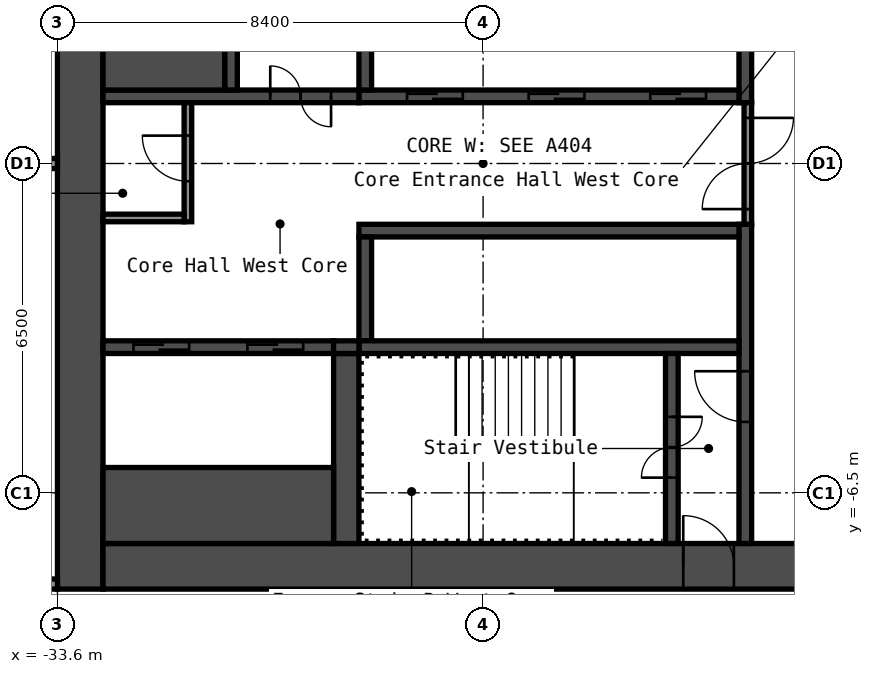
"""IFC4 building model, lengths in metres.
Left out: names, types, materials, properties, quantities, classifications, styles, units other than length and angle.
Written with IfcOpenShell. Run it as: python <this file> out.ifc"""

import sys

from ifc_helpers import new_model, si_unit, direction, frame, frame_2d, origin, place, context, subcontext, project, spatial, rectangle, extrude, element, fill, save


model = new_model("IFC4")
c1 = context("Model", 3, precision=1e-05, world=origin(), true_north=direction((0.0, 1.0)))
c2 = subcontext(c1, "Body", "Model", "MODEL_VIEW")
j1 = project(units=[si_unit("LENGTHUNIT", "METRE"), si_unit("PLANEANGLEUNIT", "RADIAN")], contexts=[c1])
p1 = place(None, origin())
s1 = spatial("IfcSite", under=j1, at=p1, CompositionType="ELEMENT")
p2 = place(p1, origin())
s2 = spatial("IfcBuilding", under=s1, at=p2, CompositionType="ELEMENT")
p3 = place(p2, frame((0.0, 0.0, 26.2)))
s3 = spatial("IfcBuildingStorey", under=s2, at=p3, CompositionType="ELEMENT", Elevation=26.2)
p4 = place(p3, frame((-33.15, -8.4, 0.0), z_axis=(0.0, 0.0, 1.0), x_axis=(0.0, 1.0, 0.0)))
e1 = element("IfcWall", 1, at=p4, inside=s3, PredefinedType="SHEAR", context=c2, shape_type="SweptSolid", body=[
    extrude(rectangle(XDim=16.8, YDim=0.9, at=frame_2d((8.4, 0.0))), origin(), (0.0, 0.0, 1.0), 2.8),
])
p5 = place(p3, frame((-32.7, -7.95, 0.0), z_axis=(0.0, 0.0, 1.0), x_axis=(1.0, 0.0, 0.0)))
e2 = element("IfcWall", 2, at=p5, inside=s3, PredefinedType="SHEAR", context=c2, shape_type="SweptSolid", body=[
    extrude(rectangle(XDim=15.0, YDim=0.9, at=frame_2d((7.5, 0.0))), origin(), (0.0, 0.0, 1.0), 2.8),
])
p6 = place(p5, frame((11.45, 0.0, 0.0)))
e3 = element("IfcOpeningElement", 3, at=p6, cuts=e2, PredefinedType="OPENING", context=c2, shape_type="SweptSolid", body=[
    extrude(rectangle(XDim=1.0, YDim=2.1, at=frame_2d((0.5, 1.05))), frame((0.0, 0.46, 0.0), z_axis=(0.0, -1.0, 0.0), x_axis=(1.0, 0.0, 0.0)), (0.0, 0.0, 1.0), 0.92),
])
p7 = place(p3, frame((-20.025, 1.2, 0.0), z_axis=(0.0, 0.0, 1.0), x_axis=(0.0, 1.0, 0.0)))
e4 = element("IfcWall", 4, at=p7, inside=s3, PredefinedType="SHEAR", context=c2, shape_type="SweptSolid", body=[
    extrude(rectangle(XDim=6.3, YDim=0.25, at=frame_2d((3.15, 0.0))), origin(), (0.0, 0.0, 1.0), 2.8),
])
p8 = place(p3, frame((-20.025, -7.5, 0.0), z_axis=(0.0, 0.0, 1.0), x_axis=(0.0, 1.0, 0.0)))
e5 = element("IfcWall", 5, at=p8, inside=s3, PredefinedType="SHEAR", context=c2, shape_type="SweptSolid", body=[
    extrude(rectangle(XDim=6.3, YDim=0.25, at=frame_2d((3.15, 0.0))), origin(), (0.0, 0.0, 1.0), 2.8),
])
p9 = place(p8, frame((2.4, 0.0, 0.0)))
e6 = element("IfcOpeningElement", 6, at=p9, cuts=e5, PredefinedType="OPENING", context=c2, shape_type="SweptSolid", body=[
    extrude(rectangle(XDim=1.0, YDim=2.1, at=frame_2d((0.5, 1.05))), frame((0.0, 0.135, 0.0), z_axis=(0.0, -1.0, 0.0), x_axis=(1.0, 0.0, 0.0)), (0.0, 0.0, 1.0), 0.27),
])
p10 = place(p3, frame((-27.65, 1.325, 0.0), z_axis=(0.0, 0.0, 1.0), x_axis=(1.0, 0.0, 0.0)))
e7 = element("IfcWall", 7, at=p10, inside=s3, PredefinedType="SHEAR", context=c2, shape_type="SweptSolid", body=[
    extrude(rectangle(XDim=7.5, YDim=0.25, at=frame_2d((3.75, 0.0))), origin(), (0.0, 0.0, 1.0), 2.8),
])
p11 = place(p10, frame((5.75, 0.0, 0.0)))
e8 = element("IfcOpeningElement", 8, at=p11, cuts=e7, PredefinedType="OPENING", context=c2, shape_type="SweptSolid", body=[
    extrude(rectangle(XDim=1.1, YDim=2.1, at=frame_2d((0.55, 1.05))), frame((0.0, 0.135, 0.0), z_axis=(0.0, -1.0, 0.0), x_axis=(1.0, 0.0, 0.0)), (0.0, 0.0, 1.0), 0.27),
])
p12 = place(p10, frame((3.35, 0.0, 0.0)))
e9 = element("IfcOpeningElement", 9, at=p12, cuts=e7, PredefinedType="OPENING", context=c2, shape_type="SweptSolid", body=[
    extrude(rectangle(XDim=1.1, YDim=2.1, at=frame_2d((0.55, 1.05))), frame((0.0, 0.135, 0.0), z_axis=(0.0, -1.0, 0.0), x_axis=(1.0, 0.0, 0.0)), (0.0, 0.0, 1.0), 0.27),
])
p13 = place(p10, frame((0.95, 0.0, 0.0)))
e10 = element("IfcOpeningElement", 10, at=p13, cuts=e7, PredefinedType="OPENING", context=c2, shape_type="SweptSolid", body=[
    extrude(rectangle(XDim=1.1, YDim=2.1, at=frame_2d((0.55, 1.05))), frame((0.0, 0.135, 0.0), z_axis=(0.0, -1.0, 0.0), x_axis=(1.0, 0.0, 0.0)), (0.0, 0.0, 1.0), 0.27),
])
p14 = place(p3, frame((-27.525, 1.45, 0.0), z_axis=(0.0, 0.0, 1.0), x_axis=(0.0, 1.0, 0.0)))
e11 = element("IfcWall", 11, at=p14, inside=s3, PredefinedType="SHEAR", context=c2, shape_type="SweptSolid", body=[
    extrude(rectangle(XDim=2.05, YDim=0.25, at=frame_2d((1.025, 0.0))), origin(), (0.0, 0.0, 1.0), 2.8),
])
p15 = place(p3, frame((-32.7, 1.325, 0.0), z_axis=(0.0, 0.0, 1.0), x_axis=(1.0, 0.0, 0.0)))
e12 = element("IfcWall", 12, at=p15, inside=s3, PredefinedType="SHEAR", context=c2, shape_type="SweptSolid", body=[
    extrude(rectangle(XDim=5.05, YDim=0.25, at=frame_2d((2.525, 0.0))), origin(), (0.0, 0.0, 1.0), 2.8),
])
p16 = place(p15, frame((3.3, 0.0, 0.0)))
e13 = element("IfcOpeningElement", 13, at=p16, cuts=e12, PredefinedType="OPENING", context=c2, shape_type="SweptSolid", body=[
    extrude(rectangle(XDim=1.2, YDim=2.1, at=frame_2d((0.6, 1.05))), frame((0.0, 0.135, 0.0), z_axis=(0.0, -1.0, 0.0), x_axis=(1.0, 0.0, 0.0)), (0.0, 0.0, 1.0), 0.27),
])
p17 = place(p3, frame((-30.175, 1.45, 0.0), z_axis=(0.0, 0.0, 1.0), x_axis=(0.0, 1.0, 0.0)))
e14 = element("IfcWall", 14, at=p17, inside=s3, PredefinedType="SHEAR", context=c2, shape_type="SweptSolid", body=[
    extrude(rectangle(XDim=6.05, YDim=0.25, at=frame_2d((3.025, 0.0))), origin(), (0.0, 0.0, 1.0), 2.8),
])
p18 = place(p17, frame((2.625, 0.0, 0.0)))
e15 = element("IfcOpeningElement", 15, at=p18, cuts=e14, PredefinedType="OPENING", context=c2, shape_type="SweptSolid", body=[
    extrude(rectangle(XDim=1.1, YDim=2.1, at=frame_2d((0.55, 1.05))), frame((0.0, 0.135, 0.0), z_axis=(0.0, -1.0, 0.0), x_axis=(1.0, 0.0, 0.0)), (0.0, 0.0, 1.0), 0.27),
])
p19 = place(p3, frame((-32.7, 2.375, 0.0), z_axis=(0.0, 0.0, 1.0), x_axis=(1.0, 0.0, 0.0)))
e16 = element("IfcWall", 16, at=p19, inside=s3, PredefinedType="SHEAR", context=c2, shape_type="SweptSolid", body=[
    extrude(rectangle(XDim=2.4, YDim=1.85, at=frame_2d((1.2, 0.0))), origin(), (0.0, 0.0, 1.0), 2.8),
])
p20 = place(p3, frame((-27.65, -1.325, 0.0), z_axis=(0.0, 0.0, 1.0), x_axis=(1.0, 0.0, 0.0)))
e17 = element("IfcWall", 17, at=p20, inside=s3, PredefinedType="SHEAR", context=c2, shape_type="SweptSolid", body=[
    extrude(rectangle(XDim=7.5, YDim=0.25, at=frame_2d((3.75, 0.0))), origin(), (0.0, 0.0, 1.0), 2.8),
])
p21 = place(p3, frame((-27.525, -3.5, 0.0), z_axis=(0.0, 0.0, 1.0), x_axis=(0.0, 1.0, 0.0)))
e18 = element("IfcWall", 18, at=p21, inside=s3, PredefinedType="SHEAR", context=c2, shape_type="SweptSolid", body=[
    extrude(rectangle(XDim=2.05, YDim=0.25, at=frame_2d((1.025, 0.0))), origin(), (0.0, 0.0, 1.0), 2.8),
])
p22 = place(p3, frame((-27.65, -3.625, 0.0), z_axis=(0.0, 0.0, 1.0), x_axis=(1.0, 0.0, 0.0)))
e19 = element("IfcWall", 19, at=p22, inside=s3, PredefinedType="SHEAR", context=c2, shape_type="SweptSolid", body=[
    extrude(rectangle(XDim=7.5, YDim=0.25, at=frame_2d((3.75, 0.0))), origin(), (0.0, 0.0, 1.0), 2.8),
])
p23 = place(p3, frame((-21.475, -7.5, 0.0), z_axis=(0.0, 0.0, 1.0), x_axis=(0.0, 1.0, 0.0)))
e20 = element("IfcWall", 20, at=p23, inside=s3, PredefinedType="SHEAR", context=c2, shape_type="SweptSolid", body=[
    extrude(rectangle(XDim=3.75, YDim=0.25, at=frame_2d((1.875, 0.0))), origin(), (0.0, 0.0, 1.0), 2.8),
])
p24 = place(p23, frame((1.3, 0.0, 0.0)))
e21 = element("IfcOpeningElement", 21, at=p24, cuts=e20, PredefinedType="OPENING", context=c2, shape_type="SweptSolid", body=[
    extrude(rectangle(XDim=1.2, YDim=2.1, at=frame_2d((0.6, 1.05))), frame((0.0, 0.135, 0.0), z_axis=(0.0, -1.0, 0.0), x_axis=(1.0, 0.0, 0.0)), (0.0, 0.0, 1.0), 0.27),
])
p25 = place(p3, frame((-27.9, -7.5, 0.0), z_axis=(0.0, 0.0, 1.0), x_axis=(0.0, 1.0, 0.0)))
e22 = element("IfcWall", 22, at=p25, inside=s3, PredefinedType="SHEAR", context=c2, shape_type="SweptSolid", body=[
    extrude(rectangle(XDim=3.75, YDim=0.5, at=frame_2d((1.875, 0.0))), origin(), (0.0, 0.0, 1.0), 2.8),
])
p26 = place(p3, frame((-32.7, -3.625, 0.0), z_axis=(0.0, 0.0, 1.0), x_axis=(1.0, 0.0, 0.0)))
e23 = element("IfcWall", 23, at=p26, inside=s3, PredefinedType="SHEAR", context=c2, shape_type="SweptSolid", body=[
    extrude(rectangle(XDim=4.55, YDim=0.25, at=frame_2d((2.275, 0.0))), origin(), (0.0, 0.0, 1.0), 2.8),
])
p27 = place(p26, frame((2.85, 0.0, 0.0)))
e24 = element("IfcOpeningElement", 24, at=p27, cuts=e23, PredefinedType="OPENING", context=c2, shape_type="SweptSolid", body=[
    extrude(rectangle(XDim=1.1, YDim=2.1, at=frame_2d((0.55, 1.05))), frame((0.0, 0.135, 0.0), z_axis=(0.0, -1.0, 0.0), x_axis=(1.0, 0.0, 0.0)), (0.0, 0.0, 1.0), 0.27),
])
p28 = place(p26, frame((0.6, 0.0, 0.0)))
e25 = element("IfcOpeningElement", 25, at=p28, cuts=e23, PredefinedType="OPENING", context=c2, shape_type="SweptSolid", body=[
    extrude(rectangle(XDim=1.1, YDim=2.1, at=frame_2d((0.55, 1.05))), frame((0.0, 0.135, 0.0), z_axis=(0.0, -1.0, 0.0), x_axis=(1.0, 0.0, 0.0)), (0.0, 0.0, 1.0), 0.27),
])
p29 = place(p3, frame((-32.7, -6.75, 0.0), z_axis=(0.0, 0.0, 1.0), x_axis=(1.0, 0.0, 0.0)))
e26 = element("IfcWall", 26, at=p29, inside=s3, PredefinedType="SHEAR", context=c2, shape_type="SweptSolid", body=[
    extrude(rectangle(XDim=4.55, YDim=1.5, at=frame_2d((2.275, 0.0))), origin(), (0.0, 0.0, 1.0), 2.8),
])
p30 = place(p3, frame((-28.15, -3.625, 0.0), z_axis=(0.0, 0.0, 1.0), x_axis=(1.0, 0.0, 0.0)))
e27 = element("IfcWall", 27, at=p30, inside=s3, PredefinedType="SHEAR", context=c2, shape_type="SweptSolid", body=[
    extrude(rectangle(XDim=0.5, YDim=0.25, at=frame_2d((0.25, 0.0))), origin(), (0.0, 0.0, 1.0), 2.8),
])
p31 = place(p3, frame((-19.975, -1.2, 0.0), z_axis=(0.0, 0.0, 1.0), x_axis=(0.0, 1.0, 0.0)))
e28 = element("IfcWall", 28, at=p31, inside=s3, PredefinedType="PARTITIONING", context=c2, shape_type="SweptSolid", body=[
    extrude(rectangle(XDim=2.4, YDim=0.15, at=frame_2d((1.2, 0.0))), origin(), (0.0, 0.0, 1.0), 2.8),
])
p32 = place(p31, frame((0.3, 0.0, 0.0)))
e29 = element("IfcOpeningElement", 29, at=p32, cuts=e28, PredefinedType="OPENING", context=c2, shape_type="SweptSolid", body=[
    extrude(rectangle(XDim=1.8, YDim=2.1, at=frame_2d((0.9, 1.05))), frame((0.0, 0.085, 0.0), z_axis=(0.0, -1.0, 0.0), x_axis=(1.0, 0.0, 0.0)), (0.0, 0.0, 1.0), 0.17),
])
p33 = place(p3, frame((-31.025, -1.15, 0.0), z_axis=(0.0, 0.0, 1.0), x_axis=(0.0, 1.0, 0.0)))
e30 = element("IfcWall", 30, at=p33, inside=s3, PredefinedType="PARTITIONING", context=c2, shape_type="SweptSolid", body=[
    extrude(rectangle(XDim=2.35, YDim=0.15, at=frame_2d((1.175, 0.0))), origin(), (0.0, 0.0, 1.0), 2.8),
])
p34 = place(p33, frame((0.8, 0.0, 0.0)))
e31 = element("IfcOpeningElement", 31, at=p34, cuts=e30, PredefinedType="OPENING", context=c2, shape_type="SweptSolid", body=[
    extrude(rectangle(XDim=0.9, YDim=2.1, at=frame_2d((0.45, 1.05))), frame((0.0, 0.085, 0.0), z_axis=(0.0, -1.0, 0.0), x_axis=(1.0, 0.0, 0.0)), (0.0, 0.0, 1.0), 0.17),
])
p35 = place(p3, frame((-32.7, -1.075, 0.0), z_axis=(0.0, 0.0, 1.0), x_axis=(1.0, 0.0, 0.0)))
e32 = element("IfcWall", 32, at=p35, inside=s3, PredefinedType="PARTITIONING", context=c2, shape_type="SweptSolid", body=[
    extrude(rectangle(XDim=1.6, YDim=0.15, at=frame_2d((0.8, 0.0))), origin(), (0.0, 0.0, 1.0), 2.8),
])
p36 = place(p3, frame((-48.6, -8.3, 0.0), z_axis=(0.0, 0.0, 1.0), x_axis=(1.0, 0.0, 0.0)))
e33 = element("IfcWall", 33, at=p36, inside=s3, PredefinedType="PARTITIONING", context=c2, shape_type="SweptSolid", body=[
    extrude(rectangle(XDim=15.0, YDim=0.2, at=frame_2d((7.5, 0.0))), origin(), (0.0, 0.0, 1.0), 2.8),
])
p37 = place(p36, frame((1.1, 0.0, 0.0)))
e34 = element("IfcOpeningElement", 34, at=p37, cuts=e33, PredefinedType="OPENING", context=c2, shape_type="SweptSolid", body=[
    extrude(rectangle(XDim=1.0, YDim=2.1, at=frame_2d((0.5, 1.05))), frame((0.0, 0.11, 0.0), z_axis=(0.0, -1.0, 0.0), x_axis=(1.0, 0.0, 0.0)), (0.0, 0.0, 1.0), 0.22),
])
p38 = place(p36, frame((12.4, 0.0, 0.0)))
e35 = element("IfcOpeningElement", 35, at=p38, cuts=e33, PredefinedType="OPENING", context=c2, shape_type="SweptSolid", body=[
    extrude(rectangle(XDim=1.0, YDim=2.1, at=frame_2d((0.5, 1.05))), frame((0.0, 0.11, 0.0), z_axis=(0.0, -1.0, 0.0), x_axis=(1.0, 0.0, 0.0)), (0.0, 0.0, 1.0), 0.22),
])
p39 = place(p3, frame((-48.5, 0.0, 0.0), z_axis=(0.0, 0.0, 1.0), x_axis=(1.0, 0.0, 0.0)))
e36 = element("IfcWall", 36, at=p39, inside=s3, PredefinedType="PARTITIONING", context=c2, shape_type="SweptSolid", body=[
    extrude(rectangle(XDim=14.9, YDim=0.2, at=frame_2d((7.45, 0.0))), origin(), (0.0, 0.0, 1.0), 2.8),
])
p40 = place(p6, origin())
e37 = element("IfcDoor", 37, at=p40, inside=s3, OperationType="SINGLE_SWING_RIGHT", PredefinedType="DOOR", context=c2, shape_type="SweptSolid", body=[
    extrude(rectangle(XDim=1.0, YDim=2.1, at=frame_2d((0.5, 1.05))), frame((0.0, 0.025, 0.0), z_axis=(0.0, -1.0, 0.0), x_axis=(1.0, 0.0, 0.0)), (0.0, 0.0, 1.0), 0.05),
])
fill(e3, e37)
p41 = place(p24, origin())
e38 = element("IfcDoor", 38, at=p41, inside=s3, OperationType="DOUBLE_DOOR_SINGLE_SWING", PredefinedType="DOOR", context=c2, shape_type="SweptSolid", body=[
    extrude(rectangle(XDim=1.2, YDim=2.1, at=frame_2d((0.6, 1.05))), frame((0.0, 0.025, 0.0), z_axis=(0.0, -1.0, 0.0), x_axis=(1.0, 0.0, 0.0)), (0.0, 0.0, 1.0), 0.05),
])
fill(e21, e38)
p42 = place(p9, origin())
e39 = element("IfcDoor", 39, at=p42, inside=s3, OperationType="SINGLE_SWING_LEFT", PredefinedType="DOOR", context=c2, shape_type="SweptSolid", body=[
    extrude(rectangle(XDim=1.0, YDim=2.1, at=frame_2d((0.5, 1.05))), frame((0.0, 0.025, 0.0), z_axis=(0.0, -1.0, 0.0), x_axis=(1.0, 0.0, 0.0)), (0.0, 0.0, 1.0), 0.05),
])
fill(e6, e39)
p43 = place(p16, origin())
e40 = element("IfcDoor", 40, at=p43, inside=s3, OperationType="DOUBLE_DOOR_SINGLE_SWING", PredefinedType="DOOR", context=c2, shape_type="SweptSolid", body=[
    extrude(rectangle(XDim=1.2, YDim=2.1, at=frame_2d((0.6, 1.05))), frame((0.0, 0.025, 0.0), z_axis=(0.0, -1.0, 0.0), x_axis=(1.0, 0.0, 0.0)), (0.0, 0.0, 1.0), 0.05),
])
fill(e13, e40)
p44 = place(p32, origin())
e41 = element("IfcDoor", 41, at=p44, inside=s3, OperationType="DOUBLE_DOOR_SINGLE_SWING", PredefinedType="DOOR", context=c2, shape_type="SweptSolid", body=[
    extrude(rectangle(XDim=1.8, YDim=2.1, at=frame_2d((0.9, 1.05))), frame((0.0, 0.025, 0.0), z_axis=(0.0, -1.0, 0.0), x_axis=(1.0, 0.0, 0.0)), (0.0, 0.0, 1.0), 0.05),
])
fill(e29, e41)
p45 = place(p34, origin())
e42 = element("IfcDoor", 42, at=p45, inside=s3, OperationType="SINGLE_SWING_LEFT", PredefinedType="DOOR", context=c2, shape_type="SweptSolid", body=[
    extrude(rectangle(XDim=0.9, YDim=2.1, at=frame_2d((0.45, 1.05))), frame((0.0, 0.025, 0.0), z_axis=(0.0, -1.0, 0.0), x_axis=(1.0, 0.0, 0.0)), (0.0, 0.0, 1.0), 0.05),
])
fill(e31, e42)
p46 = place(p11, origin())
e43 = element("IfcDoor", 43, at=p46, inside=s3, OperationType="DOUBLE_DOOR_SLIDING", PredefinedType="DOOR", context=c2, shape_type="SweptSolid", body=[
    extrude(rectangle(XDim=1.1, YDim=2.1, at=frame_2d((0.55, 1.05))), frame((0.0, 0.025, 0.0), z_axis=(0.0, -1.0, 0.0), x_axis=(1.0, 0.0, 0.0)), (0.0, 0.0, 1.0), 0.05),
])
fill(e8, e43)
p47 = place(p12, origin())
e44 = element("IfcDoor", 44, at=p47, inside=s3, OperationType="DOUBLE_DOOR_SLIDING", PredefinedType="DOOR", context=c2, shape_type="SweptSolid", body=[
    extrude(rectangle(XDim=1.1, YDim=2.1, at=frame_2d((0.55, 1.05))), frame((0.0, 0.025, 0.0), z_axis=(0.0, -1.0, 0.0), x_axis=(1.0, 0.0, 0.0)), (0.0, 0.0, 1.0), 0.05),
])
fill(e9, e44)
p48 = place(p13, origin())
e45 = element("IfcDoor", 45, at=p48, inside=s3, OperationType="DOUBLE_DOOR_SLIDING", PredefinedType="DOOR", context=c2, shape_type="SweptSolid", body=[
    extrude(rectangle(XDim=1.1, YDim=2.1, at=frame_2d((0.55, 1.05))), frame((0.0, 0.025, 0.0), z_axis=(0.0, -1.0, 0.0), x_axis=(1.0, 0.0, 0.0)), (0.0, 0.0, 1.0), 0.05),
])
fill(e10, e45)
p49 = place(p27, origin())
e46 = element("IfcDoor", 46, at=p49, inside=s3, OperationType="DOUBLE_DOOR_SLIDING", PredefinedType="DOOR", context=c2, shape_type="SweptSolid", body=[
    extrude(rectangle(XDim=1.1, YDim=2.1, at=frame_2d((0.55, 1.05))), frame((0.0, 0.025, 0.0), z_axis=(0.0, -1.0, 0.0), x_axis=(1.0, 0.0, 0.0)), (0.0, 0.0, 1.0), 0.05),
])
fill(e24, e46)
p50 = place(p28, origin())
e47 = element("IfcDoor", 47, at=p50, inside=s3, OperationType="DOUBLE_DOOR_SLIDING", PredefinedType="DOOR", context=c2, shape_type="SweptSolid", body=[
    extrude(rectangle(XDim=1.1, YDim=2.1, at=frame_2d((0.55, 1.05))), frame((0.0, 0.025, 0.0), z_axis=(0.0, -1.0, 0.0), x_axis=(1.0, 0.0, 0.0)), (0.0, 0.0, 1.0), 0.05),
])
fill(e25, e47)
save(model, sys.argv[1])
